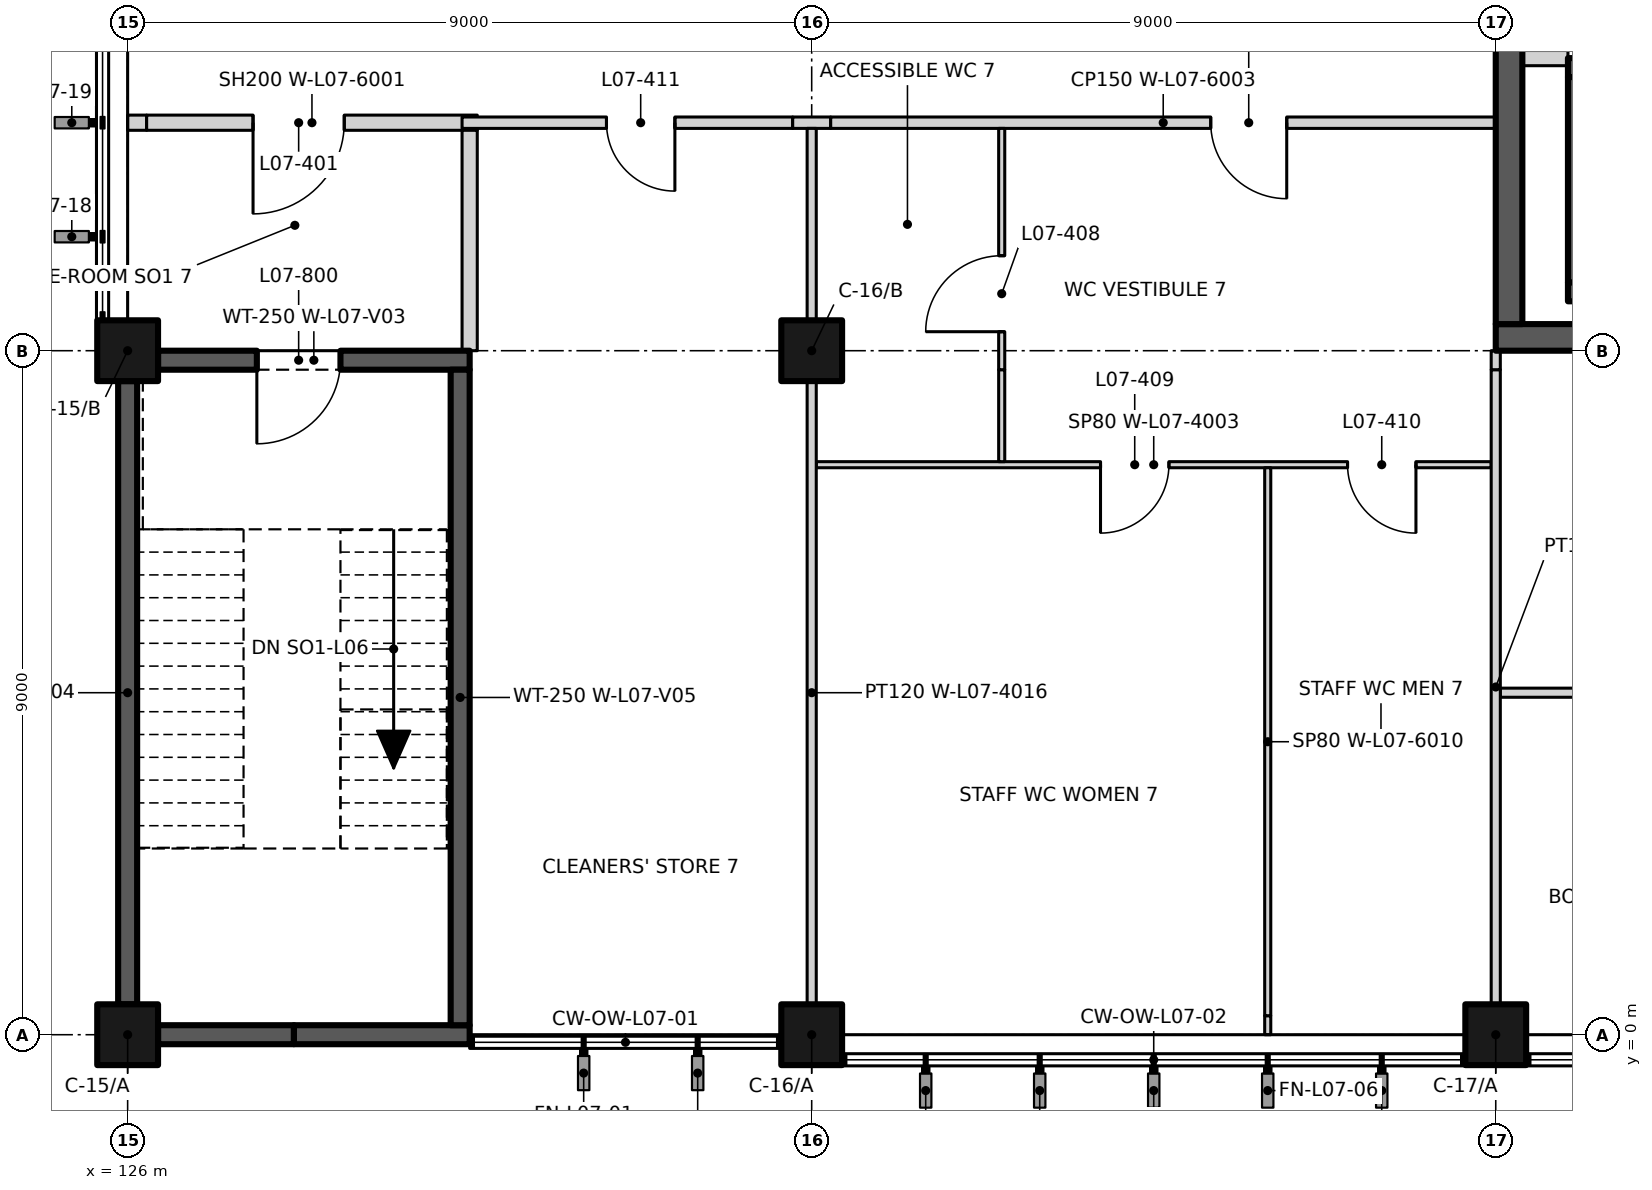
"""IFC4 building model, lengths in metres.
Left out: names, types, materials, properties, quantities, classifications, styles, units other than length and angle.
Written with IfcOpenShell. Run it as: python <this file> out.ifc"""

import sys

from ifc_helpers import new_model, si_unit, direction, frame, frame_2d, origin, origin_2d, place, context, subcontext, project, spatial, rectangle, extrude, element, fill, save


model = new_model("IFC4")
c1 = context("Model", 3, precision=1e-05, world=origin(), true_north=direction((0.0, 1.0)))
c2 = subcontext(c1, "Body", "Model", "MODEL_VIEW")
j1 = project(units=[si_unit("LENGTHUNIT", "METRE"), si_unit("PLANEANGLEUNIT", "RADIAN")], contexts=[c1])
p1 = place(None, origin())
s1 = spatial("IfcSite", under=j1, at=p1, CompositionType="ELEMENT")
p2 = place(p1, origin())
s2 = spatial("IfcBuilding", under=s1, at=p2, CompositionType="ELEMENT")
p3 = place(p2, frame((0.0, 0.0, 33.0)))
s3 = spatial("IfcBuildingStorey", under=s2, at=p3, CompositionType="ELEMENT", Elevation=33.0)
for number, where, z_axis, x_axis in (
    (1, (126.0, 0.0, 0.0), (0.0, 0.0, 1.0), (1.0, 0.0, 0.0)),
    (2, (135.0, 0.0, 0.0), (0.0, 0.0, 1.0), (1.0, 0.0, 0.0)),
    (3, (144.0, 0.0, 0.0), (0.0, 0.0, 1.0), (1.0, 0.0, 0.0)),
    (4, (126.0, 9.0, 0.0), (0.0, 0.0, 1.0), (1.0, 0.0, 0.0)),
    (5, (135.0, 9.0, 0.0), (0.0, 0.0, 1.0), (1.0, 0.0, 0.0)),
):
    element("IfcColumn", number, at=place(p3, frame(where, z_axis=z_axis, x_axis=x_axis)), inside=s3, PredefinedType="COLUMN", context=c2, shape_type="SweptSolid", body=[
        extrude(rectangle(XDim=0.8, YDim=0.8, at=origin_2d()), origin(), (0.0, 0.0, 1.0), 4.5),
    ])
p4 = place(p3, frame((126.4, 0.0, 0.0), z_axis=(0.0, 0.0, 1.0), x_axis=(1.0, 0.0, 0.0)))
e6 = element("IfcWall", 6, at=p4, inside=s3, PredefinedType="SHEAR", context=c2, shape_type="SweptSolid", body=[
    extrude(rectangle(XDim=1.788, YDim=0.25, at=frame_2d((0.894, 0.0))), origin(), (0.0, 0.0, 1.0), 3.6),
])
p5 = place(p3, frame((128.188, 0.0, 0.0), z_axis=(0.0, 0.0, 1.0), x_axis=(1.0, 0.0, 0.0)))
e7 = element("IfcWall", 7, at=p5, inside=s3, PredefinedType="SHEAR", context=c2, shape_type="SweptSolid", body=[
    extrude(rectangle(XDim=2.312, YDim=0.25, at=frame_2d((1.156, 0.0))), origin(), (0.0, 0.0, 1.0), 3.6),
])
p6 = place(p3, frame((126.4, 8.875, 0.0), z_axis=(0.0, 0.0, 1.0), x_axis=(1.0, 0.0, 0.0)))
e8 = element("IfcWall", 8, at=p6, inside=s3, PredefinedType="SHEAR", context=c2, shape_type="SweptSolid", body=[
    extrude(rectangle(XDim=4.1, YDim=0.25, at=frame_2d((2.05, 0.0))), origin(), (0.0, 0.0, 1.0), 4.2),
])
p7 = place(p6, frame((2.4, 0.0, 0.0), z_axis=(0.0, 0.0, 1.0), x_axis=(-1.0, 0.0, 0.0)))
e9 = element("IfcOpeningElement", 9, at=p7, cuts=e8, PredefinedType="OPENING", context=c2, shape_type="SweptSolid", body=[
    extrude(rectangle(XDim=1.1, YDim=2.1, at=frame_2d((0.55, 1.05))), frame((0.0, 0.135, 0.0), z_axis=(0.0, -1.0, 0.0), x_axis=(1.0, 0.0, 0.0)), (0.0, 0.0, 1.0), 0.27),
])
p8 = place(p3, frame((126.0, 0.4, 0.0), z_axis=(0.0, 0.0, 1.0), x_axis=(0.0, 1.0, 0.0)))
e10 = element("IfcWall", 10, at=p8, inside=s3, PredefinedType="SHEAR", context=c2, shape_type="SweptSolid", body=[
    extrude(rectangle(XDim=8.2, YDim=0.25, at=frame_2d((4.1, 0.0))), origin(), (0.0, 0.0, 1.0), 3.6),
])
p9 = place(p3, frame((130.375, 0.125, 0.0), z_axis=(0.0, 0.0, 1.0), x_axis=(0.0, 1.0, 0.0)))
e11 = element("IfcWall", 11, at=p9, inside=s3, PredefinedType="SHEAR", context=c2, shape_type="SweptSolid", body=[
    extrude(rectangle(XDim=8.625, YDim=0.25, at=frame_2d((4.312, 0.0))), origin(), (0.0, 0.0, 1.0), 4.2),
])
p10 = place(p3, frame((144.95, 12.725, 0.0), z_axis=(0.0, 0.0, 1.0), x_axis=(1.0, 0.0, 0.0)))
e12 = element("IfcWall", 12, at=p10, inside=s3, PredefinedType="SHEAR", context=c2, shape_type="SweptSolid", body=[
    extrude(rectangle(XDim=12.05, YDim=0.25, at=frame_2d((6.025, 0.0))), origin(), (0.0, 0.0, 1.0), 4.5),
])
p11 = place(p10, frame((1.05, 0.0, 0.0)))
e13 = element("IfcOpeningElement", 13, at=p11, cuts=e12, PredefinedType="OPENING", context=c2, shape_type="SweptSolid", body=[
    extrude(rectangle(XDim=1.1, YDim=2.1, at=frame_2d((0.55, 1.05))), frame((0.0, 0.135, 0.0), z_axis=(0.0, -1.0, 0.0), x_axis=(1.0, 0.0, 0.0)), (0.0, 0.0, 1.0), 0.27),
])
p12 = place(p10, frame((4.0, 0.0, 0.0)))
e14 = element("IfcOpeningElement", 14, at=p12, cuts=e12, PredefinedType="OPENING", context=c2, shape_type="SweptSolid", body=[
    extrude(rectangle(XDim=1.1, YDim=2.1, at=frame_2d((0.55, 1.05))), frame((0.0, 0.135, 0.0), z_axis=(0.0, -1.0, 0.0), x_axis=(1.0, 0.0, 0.0)), (0.0, 0.0, 1.0), 0.27),
])
p13 = place(p10, frame((6.95, 0.0, 0.0)))
e15 = element("IfcOpeningElement", 15, at=p13, cuts=e12, PredefinedType="OPENING", context=c2, shape_type="SweptSolid", body=[
    extrude(rectangle(XDim=1.1, YDim=2.1, at=frame_2d((0.55, 1.05))), frame((0.0, 0.135, 0.0), z_axis=(0.0, -1.0, 0.0), x_axis=(1.0, 0.0, 0.0)), (0.0, 0.0, 1.0), 0.27),
])
p14 = place(p10, frame((9.9, 0.0, 0.0)))
e16 = element("IfcOpeningElement", 16, at=p14, cuts=e12, PredefinedType="OPENING", context=c2, shape_type="SweptSolid", body=[
    extrude(rectangle(XDim=1.1, YDim=2.1, at=frame_2d((0.55, 1.05))), frame((0.0, 0.135, 0.0), z_axis=(0.0, -1.0, 0.0), x_axis=(1.0, 0.0, 0.0)), (0.0, 0.0, 1.0), 0.27),
])
p15 = place(p3, frame((144.95, 9.775, 0.0), z_axis=(0.0, 0.0, 1.0), x_axis=(1.0, 0.0, 0.0)))
e17 = element("IfcWall", 17, at=p15, inside=s3, PredefinedType="SHEAR", context=c2, shape_type="SweptSolid", body=[
    extrude(rectangle(XDim=12.05, YDim=0.25, at=frame_2d((6.025, 0.0))), origin(), (0.0, 0.0, 1.0), 4.5),
])
p16 = place(p3, frame((145.075, 9.9, 0.0), z_axis=(0.0, 0.0, 1.0), x_axis=(0.0, 1.0, 0.0)))
e18 = element("IfcWall", 18, at=p16, inside=s3, PredefinedType="SHEAR", context=c2, shape_type="SweptSolid", body=[
    extrude(rectangle(XDim=2.7, YDim=0.25, at=frame_2d((1.35, 0.0))), origin(), (0.0, 0.0, 1.0), 4.5),
])
p17 = place(p3, frame((144.06, 4.5, 0.0), z_axis=(0.0, 0.0, 1.0), x_axis=(1.0, 0.0, 0.0)))
e19 = element("IfcWall", 19, at=p17, inside=s3, PredefinedType="PARTITIONING", context=c2, shape_type="SweptSolid", body=[
    extrude(rectangle(XDim=6.0, YDim=0.12, at=frame_2d((3.0, 0.0))), origin(), (0.0, 0.0, 1.0), 4.2),
])
p18 = place(p17, frame((3.39, 0.0, 0.0), z_axis=(0.0, 0.0, 1.0), x_axis=(-1.0, 0.0, 0.0)))
e20 = element("IfcOpeningElement", 20, at=p18, cuts=e19, PredefinedType="OPENING", context=c2, shape_type="SweptSolid", body=[
    extrude(rectangle(XDim=0.9, YDim=2.1, at=frame_2d((0.45, 1.05))), frame((0.0, 0.07, 0.0), z_axis=(0.0, -1.0, 0.0), x_axis=(1.0, 0.0, 0.0)), (0.0, 0.0, 1.0), 0.14),
])
p19 = place(p3, frame((135.06, 7.5, 0.0), z_axis=(0.0, 0.0, 1.0), x_axis=(1.0, 0.0, 0.0)))
e21 = element("IfcWall", 21, at=p19, inside=s3, PredefinedType="PARTITIONING", context=c2, shape_type="SweptSolid", body=[
    extrude(rectangle(XDim=8.88, YDim=0.08, at=frame_2d((4.44, 0.0))), origin(), (0.0, 0.0, 1.0), 4.2),
])
p20 = place(p19, frame((4.64, 0.0, 0.0), z_axis=(0.0, 0.0, 1.0), x_axis=(-1.0, 0.0, 0.0)))
e22 = element("IfcOpeningElement", 22, at=p20, cuts=e21, PredefinedType="OPENING", context=c2, shape_type="SweptSolid", body=[
    extrude(rectangle(XDim=0.9, YDim=2.1, at=frame_2d((0.45, 1.05))), frame((0.0, 0.05, 0.0), z_axis=(0.0, -1.0, 0.0), x_axis=(1.0, 0.0, 0.0)), (0.0, 0.0, 1.0), 0.1),
])
p21 = place(p19, frame((7.89, 0.0, 0.0), z_axis=(0.0, 0.0, 1.0), x_axis=(-1.0, 0.0, 0.0)))
e23 = element("IfcOpeningElement", 23, at=p21, cuts=e21, PredefinedType="OPENING", context=c2, shape_type="SweptSolid", body=[
    extrude(rectangle(XDim=0.9, YDim=2.1, at=frame_2d((0.45, 1.05))), frame((0.0, 0.05, 0.0), z_axis=(0.0, -1.0, 0.0), x_axis=(1.0, 0.0, 0.0)), (0.0, 0.0, 1.0), 0.1),
])
p22 = place(p3, frame((144.0, 9.175, 0.0), z_axis=(0.0, 0.0, 1.0), x_axis=(1.0, 0.0, 0.0)))
e24 = element("IfcWall", 24, at=p22, inside=s3, PredefinedType="SHEAR", context=c2, shape_type="SweptSolid", body=[
    extrude(rectangle(XDim=18.0, YDim=0.35, at=frame_2d((9.0, 0.0))), origin(), (0.0, 0.0, 1.0), 4.2),
])
p23 = place(p22, frame((16.463, 0.0, 0.0), z_axis=(0.0, 0.0, 1.0), x_axis=(-1.0, 0.0, 0.0)))
e25 = element("IfcOpeningElement", 25, at=p23, cuts=e24, PredefinedType="OPENING", context=c2, shape_type="SweptSolid", body=[
    extrude(rectangle(XDim=2.1, YDim=2.4, at=frame_2d((1.05, 1.2))), frame((0.0, 0.185, 0.0), z_axis=(0.0, -1.0, 0.0), x_axis=(1.0, 0.0, 0.0)), (0.0, 0.0, 1.0), 0.37),
])
p24 = place(p3, frame((126.0, 12.0, 0.0), z_axis=(0.0, 0.0, 1.0), x_axis=(1.0, 0.0, 0.0)))
e26 = element("IfcWall", 26, at=p24, inside=s3, PredefinedType="PARTITIONING", context=c2, shape_type="SweptSolid", body=[
    extrude(rectangle(XDim=0.25, YDim=0.2, at=frame_2d((0.125, 0.0))), origin(), (0.0, 0.0, 1.0), 3.6),
])
p25 = place(p3, frame((126.25, 12.0, 0.0), z_axis=(0.0, 0.0, 1.0), x_axis=(1.0, 0.0, 0.0)))
e27 = element("IfcWall", 27, at=p25, inside=s3, PredefinedType="PARTITIONING", context=c2, shape_type="SweptSolid", body=[
    extrude(rectangle(XDim=4.35, YDim=0.2, at=frame_2d((2.175, 0.0))), origin(), (0.0, 0.0, 1.0), 4.2),
])
p26 = place(p25, frame((2.6, 0.0, 0.0), z_axis=(0.0, 0.0, 1.0), x_axis=(-1.0, 0.0, 0.0)))
e28 = element("IfcOpeningElement", 28, at=p26, cuts=e27, PredefinedType="OPENING", context=c2, shape_type="SweptSolid", body=[
    extrude(rectangle(XDim=1.2, YDim=2.1, at=frame_2d((0.6, 1.05))), frame((0.0, 0.11, 0.0), z_axis=(0.0, -1.0, 0.0), x_axis=(1.0, 0.0, 0.0)), (0.0, 0.0, 1.0), 0.22),
])
p27 = place(p3, frame((130.4, 12.0, 0.0), z_axis=(0.0, 0.0, 1.0), x_axis=(1.0, 0.0, 0.0)))
e29 = element("IfcWall", 29, at=p27, inside=s3, PredefinedType="PARTITIONING", context=c2, shape_type="SweptSolid", body=[
    extrude(rectangle(XDim=4.35, YDim=0.15, at=frame_2d((2.175, 0.0))), origin(), (0.0, 0.0, 1.0), 4.2),
])
p28 = place(p27, frame((2.8, 0.0, 0.0), z_axis=(0.0, 0.0, 1.0), x_axis=(-1.0, 0.0, 0.0)))
e30 = element("IfcOpeningElement", 30, at=p28, cuts=e29, PredefinedType="OPENING", context=c2, shape_type="SweptSolid", body=[
    extrude(rectangle(XDim=0.9, YDim=2.1, at=frame_2d((0.45, 1.05))), frame((0.0, 0.085, 0.0), z_axis=(0.0, -1.0, 0.0), x_axis=(1.0, 0.0, 0.0)), (0.0, 0.0, 1.0), 0.17),
])
p29 = place(p3, frame((134.75, 12.0, 0.0), z_axis=(0.0, 0.0, 1.0), x_axis=(1.0, 0.0, 0.0)))
e31 = element("IfcWall", 31, at=p29, inside=s3, PredefinedType="PARTITIONING", context=c2, shape_type="SweptSolid", body=[
    extrude(rectangle(XDim=0.5, YDim=0.15, at=frame_2d((0.25, 0.0))), origin(), (0.0, 0.0, 1.0), 3.6),
])
p30 = place(p3, frame((135.25, 12.0, 0.0), z_axis=(0.0, 0.0, 1.0), x_axis=(1.0, 0.0, 0.0)))
e32 = element("IfcWall", 32, at=p30, inside=s3, PredefinedType="PARTITIONING", context=c2, shape_type="SweptSolid", body=[
    extrude(rectangle(XDim=8.75, YDim=0.15, at=frame_2d((4.375, 0.0))), origin(), (0.0, 0.0, 1.0), 4.2),
])
p31 = place(p30, frame((6.0, 0.0, 0.0), z_axis=(0.0, 0.0, 1.0), x_axis=(-1.0, 0.0, 0.0)))
e33 = element("IfcOpeningElement", 33, at=p31, cuts=e32, PredefinedType="OPENING", context=c2, shape_type="SweptSolid", body=[
    extrude(rectangle(XDim=1.0, YDim=2.1, at=frame_2d((0.5, 1.05))), frame((0.0, 0.085, 0.0), z_axis=(0.0, -1.0, 0.0), x_axis=(1.0, 0.0, 0.0)), (0.0, 0.0, 1.0), 0.17),
])
p32 = place(p3, frame((144.35, 12.85, 0.0), z_axis=(0.0, 0.0, 1.0), x_axis=(1.0, 0.0, 0.0)))
e34 = element("IfcWall", 34, at=p32, inside=s3, PredefinedType="PARTITIONING", context=c2, shape_type="SweptSolid", body=[
    extrude(rectangle(XDim=0.6, YDim=0.2, at=frame_2d((0.3, 0.0))), origin(), (0.0, 0.0, 1.0), 4.2),
])
p33 = place(p3, frame((130.5, 9.0, 0.0), z_axis=(0.0, 0.0, 1.0), x_axis=(0.0, 1.0, 0.0)))
e35 = element("IfcWall", 35, at=p33, inside=s3, PredefinedType="PARTITIONING", context=c2, shape_type="SweptSolid", body=[
    extrude(rectangle(XDim=2.9, YDim=0.2, at=frame_2d((1.45, 0.0))), origin(), (0.0, 0.0, 1.0), 4.2),
])
p34 = place(p3, frame((135.0, 0.4, 0.0), z_axis=(0.0, 0.0, 1.0), x_axis=(0.0, 1.0, 0.0)))
e36 = element("IfcWall", 36, at=p34, inside=s3, PredefinedType="PARTITIONING", context=c2, shape_type="SweptSolid", body=[
    extrude(rectangle(XDim=8.2, YDim=0.12, at=frame_2d((4.1, 0.0))), origin(), (0.0, 0.0, 1.0), 4.2),
])
p35 = place(p3, frame((135.0, 9.4, 0.0), z_axis=(0.0, 0.0, 1.0), x_axis=(0.0, 1.0, 0.0)))
e37 = element("IfcWall", 37, at=p35, inside=s3, PredefinedType="PARTITIONING", context=c2, shape_type="SweptSolid", body=[
    extrude(rectangle(XDim=2.525, YDim=0.12, at=frame_2d((1.263, 0.0))), origin(), (0.0, 0.0, 1.0), 3.6),
])
p36 = place(p3, frame((137.5, 7.54, 0.0), z_axis=(0.0, 0.0, 1.0), x_axis=(0.0, 1.0, 0.0)))
e38 = element("IfcWall", 38, at=p36, inside=s3, PredefinedType="PARTITIONING", context=c2, shape_type="SweptSolid", body=[
    extrude(rectangle(XDim=1.21, YDim=0.08, at=frame_2d((0.605, 0.0))), origin(), (0.0, 0.0, 1.0), 4.2),
])
p37 = place(p3, frame((137.5, 8.75, 0.0), z_axis=(0.0, 0.0, 1.0), x_axis=(0.0, 1.0, 0.0)))
e39 = element("IfcWall", 39, at=p37, inside=s3, PredefinedType="PARTITIONING", context=c2, shape_type="SweptSolid", body=[
    extrude(rectangle(XDim=0.5, YDim=0.08, at=frame_2d((0.25, 0.0))), origin(), (0.0, 0.0, 1.0), 3.6),
])
p38 = place(p3, frame((137.5, 9.25, 0.0), z_axis=(0.0, 0.0, 1.0), x_axis=(0.0, 1.0, 0.0)))
e40 = element("IfcWall", 40, at=p38, inside=s3, PredefinedType="PARTITIONING", context=c2, shape_type="SweptSolid", body=[
    extrude(rectangle(XDim=2.675, YDim=0.08, at=frame_2d((1.337, 0.0))), origin(), (0.0, 0.0, 1.0), 4.2),
])
p39 = place(p38, origin())
e41 = element("IfcOpeningElement", 41, at=p39, cuts=e40, PredefinedType="OPENING", context=c2, shape_type="SweptSolid", body=[
    extrude(rectangle(XDim=1.0, YDim=2.1, at=frame_2d((0.5, 1.05))), frame((0.0, 0.05, 0.0), z_axis=(0.0, -1.0, 0.0), x_axis=(1.0, 0.0, 0.0)), (0.0, 0.0, 1.0), 0.1),
])
p40 = place(p3, frame((141.0, 0.0, 0.0), z_axis=(0.0, 0.0, 1.0), x_axis=(0.0, 1.0, 0.0)))
e42 = element("IfcWall", 42, at=p40, inside=s3, PredefinedType="PARTITIONING", context=c2, shape_type="SweptSolid", body=[
    extrude(rectangle(XDim=0.25, YDim=0.08, at=frame_2d((0.125, 0.0))), origin(), (0.0, 0.0, 1.0), 3.6),
])
p41 = place(p3, frame((141.0, 0.25, 0.0), z_axis=(0.0, 0.0, 1.0), x_axis=(0.0, 1.0, 0.0)))
e43 = element("IfcWall", 43, at=p41, inside=s3, PredefinedType="PARTITIONING", context=c2, shape_type="SweptSolid", body=[
    extrude(rectangle(XDim=7.21, YDim=0.08, at=frame_2d((3.605, 0.0))), origin(), (0.0, 0.0, 1.0), 4.2),
])
p42 = place(p3, frame((144.0, 0.4, 0.0), z_axis=(0.0, 0.0, 1.0), x_axis=(0.0, 1.0, 0.0)))
e44 = element("IfcWall", 44, at=p42, inside=s3, PredefinedType="PARTITIONING", context=c2, shape_type="SweptSolid", body=[
    extrude(rectangle(XDim=8.35, YDim=0.12, at=frame_2d((4.175, 0.0))), origin(), (0.0, 0.0, 1.0), 4.2),
])
p43 = place(p3, frame((144.0, 8.75, 0.0), z_axis=(0.0, 0.0, 1.0), x_axis=(0.0, 1.0, 0.0)))
e45 = element("IfcWall", 45, at=p43, inside=s3, PredefinedType="PARTITIONING", context=c2, shape_type="SweptSolid", body=[
    extrude(rectangle(XDim=0.25, YDim=0.12, at=frame_2d((0.125, 0.0))), origin(), (0.0, 0.0, 1.0), 3.6),
])
p44 = place(p3, frame((144.175, 9.35, 0.0), z_axis=(0.0, 0.0, 1.0), x_axis=(0.0, 1.0, 0.0)))
e46 = element("IfcWall", 46, at=p44, inside=s3, PredefinedType="SHEAR", context=c2, shape_type="SweptSolid", body=[
    extrude(rectangle(XDim=17.4, YDim=0.35, at=frame_2d((8.7, 0.0))), origin(), (0.0, 0.0, 1.0), 4.2),
])
p45 = place(p44, frame((3.75, 0.0, 0.0)))
e47 = element("IfcOpeningElement", 47, at=p45, cuts=e46, PredefinedType="OPENING", context=c2, shape_type="SweptSolid", body=[
    extrude(rectangle(XDim=1.6, YDim=2.4, at=frame_2d((0.8, 1.2))), frame((0.0, 0.185, 0.0), z_axis=(0.0, -1.0, 0.0), x_axis=(1.0, 0.0, 0.0)), (0.0, 0.0, 1.0), 0.37),
])
p46 = place(p7, origin())
e48 = element("IfcDoor", 48, at=p46, inside=s3, OperationType="SINGLE_SWING_RIGHT", PredefinedType="DOOR", context=c2, shape_type="SweptSolid", body=[
    extrude(rectangle(XDim=1.1, YDim=2.1, at=frame_2d((0.55, 1.05))), frame((0.0, 0.025, 0.0), z_axis=(0.0, -1.0, 0.0), x_axis=(1.0, 0.0, 0.0)), (0.0, 0.0, 1.0), 0.05),
])
fill(e9, e48)
p47 = place(p26, origin())
e49 = element("IfcDoor", 49, at=p47, inside=s3, OperationType="SINGLE_SWING_RIGHT", PredefinedType="DOOR", context=c2, shape_type="SweptSolid", body=[
    extrude(rectangle(XDim=1.2, YDim=2.1, at=frame_2d((0.6, 1.05))), frame((0.0, 0.025, 0.0), z_axis=(0.0, -1.0, 0.0), x_axis=(1.0, 0.0, 0.0)), (0.0, 0.0, 1.0), 0.05),
])
fill(e28, e49)
p48 = place(p31, origin())
e50 = element("IfcDoor", 50, at=p48, inside=s3, OperationType="SINGLE_SWING_LEFT", PredefinedType="DOOR", context=c2, shape_type="SweptSolid", body=[
    extrude(rectangle(XDim=1.0, YDim=2.1, at=frame_2d((0.5, 1.05))), frame((0.0, 0.025, 0.0), z_axis=(0.0, -1.0, 0.0), x_axis=(1.0, 0.0, 0.0)), (0.0, 0.0, 1.0), 0.05),
])
fill(e33, e50)
p49 = place(p39, origin())
e51 = element("IfcDoor", 51, at=p49, inside=s3, OperationType="SINGLE_SWING_LEFT", PredefinedType="DOOR", context=c2, shape_type="SweptSolid", body=[
    extrude(rectangle(XDim=1.0, YDim=2.1, at=frame_2d((0.5, 1.05))), frame((0.0, 0.025, 0.0), z_axis=(0.0, -1.0, 0.0), x_axis=(1.0, 0.0, 0.0)), (0.0, 0.0, 1.0), 0.05),
])
fill(e41, e51)
p50 = place(p20, origin())
e52 = element("IfcDoor", 52, at=p50, inside=s3, OperationType="SINGLE_SWING_RIGHT", PredefinedType="DOOR", context=c2, shape_type="SweptSolid", body=[
    extrude(rectangle(XDim=0.9, YDim=2.1, at=frame_2d((0.45, 1.05))), frame((0.0, 0.025, 0.0), z_axis=(0.0, -1.0, 0.0), x_axis=(1.0, 0.0, 0.0)), (0.0, 0.0, 1.0), 0.05),
])
fill(e22, e52)
p51 = place(p21, origin())
e53 = element("IfcDoor", 53, at=p51, inside=s3, OperationType="SINGLE_SWING_LEFT", PredefinedType="DOOR", context=c2, shape_type="SweptSolid", body=[
    extrude(rectangle(XDim=0.9, YDim=2.1, at=frame_2d((0.45, 1.05))), frame((0.0, 0.025, 0.0), z_axis=(0.0, -1.0, 0.0), x_axis=(1.0, 0.0, 0.0)), (0.0, 0.0, 1.0), 0.05),
])
fill(e23, e53)
p52 = place(p28, origin())
e54 = element("IfcDoor", 54, at=p52, inside=s3, OperationType="SINGLE_SWING_LEFT", PredefinedType="DOOR", context=c2, shape_type="SweptSolid", body=[
    extrude(rectangle(XDim=0.9, YDim=2.1, at=frame_2d((0.45, 1.05))), frame((0.0, 0.025, 0.0), z_axis=(0.0, -1.0, 0.0), x_axis=(1.0, 0.0, 0.0)), (0.0, 0.0, 1.0), 0.05),
])
fill(e30, e54)
save(model, sys.argv[1])
